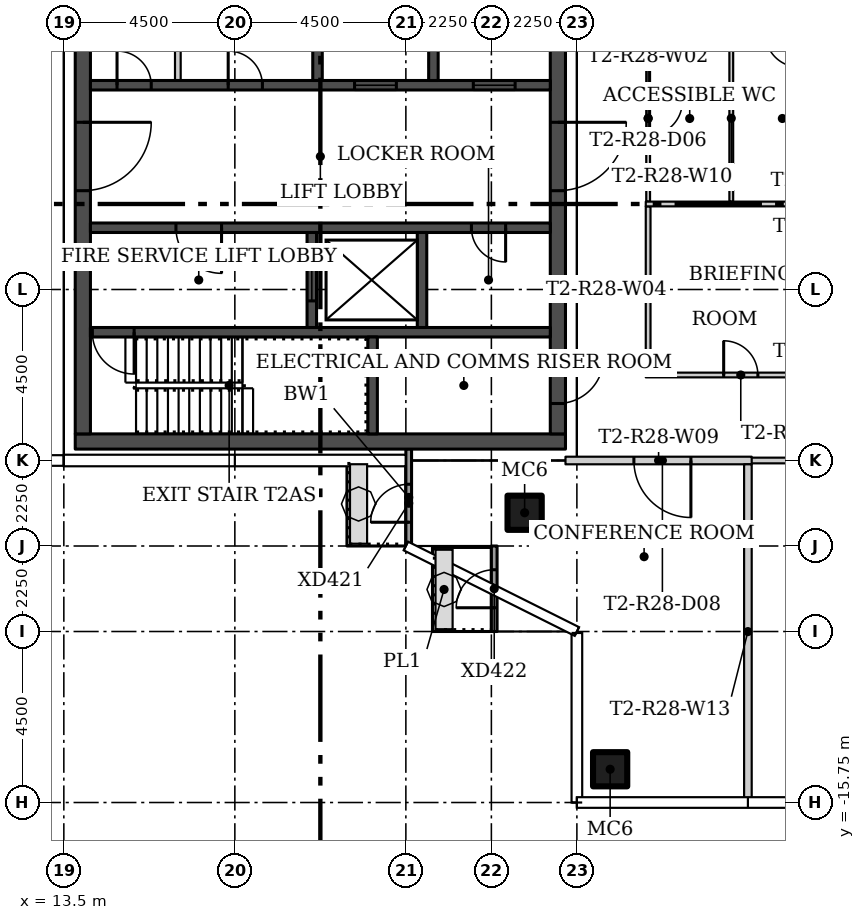
"""IFC4 building model, lengths in metres.
Left out: names, types, materials, properties, quantities, classifications, styles, units other than length and angle.
Written with IfcOpenShell. Run it as: python <this file> out.ifc"""

import sys

from ifc_helpers import new_model, si_unit, direction, frame, frame_2d, origin, origin_2d, place, context, subcontext, project, spatial, rectangle, hollow_rectangle, extrude, element, fill, save


model = new_model("IFC4")
c1 = context("Model", 3, precision=1e-05, world=origin(), true_north=direction((0.0, 1.0)))
c2 = subcontext(c1, "Body", "Model", "MODEL_VIEW")
j1 = project(units=[si_unit("LENGTHUNIT", "METRE"), si_unit("PLANEANGLEUNIT", "RADIAN")], contexts=[c1])
p1 = place(None, origin())
s1 = spatial("IfcSite", under=j1, at=p1, CompositionType="ELEMENT")
p2 = place(p1, origin())
s2 = spatial("IfcBuilding", under=s1, at=p2, CompositionType="ELEMENT")
p3 = place(p2, frame((0.0, 0.0, 257.7)))
s3 = spatial("IfcBuildingStorey", under=s2, at=p3, CompositionType="ELEMENT", Elevation=257.7)
for number, where in (
    (1, (25.625, -8.125, 0.0)),
    (2, (27.875, -14.875, 0.0)),
):
    element("IfcColumn", number, at=place(p3, frame(where)), inside=s3, PredefinedType="COLUMN", context=c2, shape_type="SweptSolid", body=[
        extrude(hollow_rectangle(XDim=0.9, YDim=0.9, WallThickness=0.036, at=origin_2d()), origin(), (0.0, 0.0, 1.0), 3.55),
    ])
p4 = place(p3, frame((28.875, 4.45, 0.0), z_axis=(0.0, 0.0, 1.0), x_axis=(0.0, -1.0, 0.0)))
e3 = element("IfcWall", 3, at=p4, inside=s3, PredefinedType="PARTITIONING", context=c2, shape_type="SweptSolid", body=[
    extrude(rectangle(XDim=4.387, YDim=0.1, at=frame_2d((2.194, 0.0))), origin(), (0.0, 0.0, 1.0), 3.55),
])
p5 = place(p4, frame((1.75, 0.0, 0.0)))
e4 = element("IfcOpeningElement", 4, at=p5, cuts=e3, PredefinedType="OPENING", context=c2, shape_type="SweptSolid", body=[
    extrude(rectangle(XDim=0.9, YDim=2.1, at=frame_2d((0.45, 1.05))), frame((0.0, 0.06, 0.0), z_axis=(0.0, -1.0, 0.0), x_axis=(1.0, 0.0, 0.0)), (0.0, 0.0, 1.0), 0.12),
])
p6 = place(p3, frame((28.812, -4.5, 0.0)))
e5 = element("IfcWall", 5, at=p6, inside=s3, PredefinedType="PARTITIONING", context=c2, shape_type="SweptSolid", body=[
    extrude(rectangle(XDim=9.875, YDim=0.125, at=frame_2d((4.938, 0.0))), origin(), (0.0, 0.0, 1.0), 3.55),
])
p7 = place(p6, frame((6.925, 0.0, 0.0)))
e6 = element("IfcOpeningElement", 6, at=p7, cuts=e5, PredefinedType="OPENING", context=c2, shape_type="SweptSolid", body=[
    extrude(rectangle(XDim=0.9, YDim=2.1, at=frame_2d((0.45, 1.05))), frame((0.0, 0.073, 0.0), z_axis=(0.0, -1.0, 0.0), x_axis=(1.0, 0.0, 0.0)), (0.0, 0.0, 1.0), 0.145),
])
p8 = place(p6, frame((2.05, 0.0, 0.0)))
e7 = element("IfcOpeningElement", 7, at=p8, cuts=e5, PredefinedType="OPENING", context=c2, shape_type="SweptSolid", body=[
    extrude(rectangle(XDim=0.9, YDim=2.1, at=frame_2d((0.45, 1.05))), frame((0.0, 0.073, 0.0), z_axis=(0.0, -1.0, 0.0), x_axis=(1.0, 0.0, 0.0)), (0.0, 0.0, 1.0), 0.145),
])
p9 = place(p3, frame((28.875, -0.062, 0.0), z_axis=(0.0, 0.0, 1.0), x_axis=(0.0, -1.0, 0.0)))
e8 = element("IfcWall", 8, at=p9, inside=s3, PredefinedType="PARTITIONING", context=c2, shape_type="SweptSolid", body=[
    extrude(rectangle(XDim=4.375, YDim=0.125, at=frame_2d((2.188, 0.0))), origin(), (0.0, 0.0, 1.0), 3.55),
])
p10 = place(p3, frame((40.8, -6.75, 0.0), z_axis=(0.0, 0.0, 1.0), x_axis=(-1.0, 0.0, 0.0)))
e9 = element("IfcWall", 9, at=p10, inside=s3, PredefinedType="PARTITIONING", context=c2, shape_type="SweptSolid", body=[
    extrude(rectangle(XDim=9.4, YDim=0.15, at=frame_2d((4.7, 0.0))), origin(), (0.0, 0.0, 1.0), 3.55),
])
p11 = place(p10, frame((4.3, 0.0, 0.0)))
e10 = element("IfcOpeningElement", 10, at=p11, cuts=e9, PredefinedType="OPENING", context=c2, shape_type="SweptSolid", body=[
    extrude(rectangle(XDim=1.0, YDim=2.4, at=frame_2d((0.5, 1.2))), frame((0.0, 0.085, 0.0), z_axis=(0.0, -1.0, 0.0), x_axis=(1.0, 0.0, 0.0)), (0.0, 0.0, 1.0), 0.17),
])
p12 = place(p3, frame((31.6, -6.75, 0.0), z_axis=(0.0, 0.0, 1.0), x_axis=(-1.0, 0.0, 0.0)))
e11 = element("IfcWall", 11, at=p12, inside=s3, PredefinedType="PARTITIONING", context=c2, shape_type="SweptSolid", body=[
    extrude(rectangle(XDim=4.9, YDim=0.2, at=frame_2d((2.45, 0.0))), origin(), (0.0, 0.0, 1.0), 3.55),
])
p13 = place(p12, frame((1.6, 0.0, 0.0)))
e12 = element("IfcOpeningElement", 12, at=p13, cuts=e11, PredefinedType="OPENING", context=c2, shape_type="SweptSolid", body=[
    extrude(rectangle(XDim=1.5, YDim=2.4, at=frame_2d((0.75, 1.2))), frame((0.0, 0.11, 0.0), z_axis=(0.0, -1.0, 0.0), x_axis=(1.0, 0.0, 0.0)), (0.0, 0.0, 1.0), 0.22),
])
p14 = place(p3, frame((31.062, 4.45, 0.0), z_axis=(0.0, 0.0, 1.0), x_axis=(0.0, -1.0, 0.0)))
e13 = element("IfcWall", 13, at=p14, inside=s3, PredefinedType="PARTITIONING", context=c2, shape_type="SweptSolid", body=[
    extrude(rectangle(XDim=4.387, YDim=0.1, at=frame_2d((2.194, 0.0))), origin(), (0.0, 0.0, 1.0), 3.55),
])
p15 = place(p3, frame((28.812, 0.0, 0.0)))
e14 = element("IfcWall", 14, at=p15, inside=s3, PredefinedType="PARTITIONING", context=c2, shape_type="SweptSolid", body=[
    extrude(rectangle(XDim=9.75, YDim=0.125, at=frame_2d((4.875, 0.0))), origin(), (0.0, 0.0, 1.0), 3.55),
])
p16 = place(p3, frame((31.5, -6.85, 0.0), z_axis=(0.0, 0.0, 1.0), x_axis=(0.0, -1.0, 0.0)))
e15 = element("IfcWall", 15, at=p16, inside=s3, PredefinedType="PARTITIONING", context=c2, shape_type="SweptSolid", body=[
    extrude(rectangle(XDim=8.805, YDim=0.2, at=frame_2d((4.402, 0.0))), origin(), (0.0, 0.0, 1.0), 3.55),
])
p17 = place(p3, frame((22.575, -9.0, 0.0), z_axis=(0.0, 0.0, 1.0), x_axis=(0.0, 1.0, 0.0)))
e16 = element("IfcWall", 16, at=p17, inside=s3, PredefinedType="SOLIDWALL", context=c2, shape_type="SweptSolid", body=[
    extrude(rectangle(XDim=2.557, YDim=0.15, at=frame_2d((1.278, 0.0))), origin(), (0.0, 0.0, 1.0), 3.45),
])
p18 = place(p17, frame((0.625, 0.0, 0.0)))
e17 = element("IfcOpeningElement", 17, at=p18, cuts=e16, PredefinedType="OPENING", context=c2, shape_type="SweptSolid", body=[
    extrude(rectangle(XDim=1.0, YDim=2.4, at=frame_2d((0.5, 1.2))), frame((0.0, 0.085, 0.0), z_axis=(0.0, -1.0, 0.0), x_axis=(1.0, 0.0, 0.0)), (0.0, 0.0, 1.0), 0.17),
])
p19 = place(p3, frame((24.825, -11.25, 0.0), z_axis=(0.0, 0.0, 1.0), x_axis=(0.0, 1.0, 0.0)))
e18 = element("IfcWall", 18, at=p19, inside=s3, PredefinedType="SOLIDWALL", context=c2, shape_type="SweptSolid", body=[
    extrude(rectangle(XDim=2.25, YDim=0.15, at=frame_2d((1.125, 0.0))), origin(), (0.0, 0.0, 1.0), 3.45),
])
p20 = place(p19, frame((0.625, 0.0, 0.0)))
e19 = element("IfcOpeningElement", 19, at=p20, cuts=e18, PredefinedType="OPENING", context=c2, shape_type="SweptSolid", body=[
    extrude(rectangle(XDim=1.0, YDim=2.4, at=frame_2d((0.5, 1.2))), frame((0.0, 0.085, 0.0), z_axis=(0.0, -1.0, 0.0), x_axis=(1.0, 0.0, 0.0)), (0.0, 0.0, 1.0), 0.17),
])
p21 = place(p3, frame((13.8, -6.25, 0.0)))
e20 = element("IfcWall", 20, at=p21, inside=s3, PredefinedType="SHEAR", context=c2, shape_type="SweptSolid", body=[
    extrude(rectangle(XDim=12.9, YDim=0.4, at=frame_2d((6.45, 0.0))), origin(), (0.0, 0.0, 1.0), 3.55),
])
p22 = place(p3, frame((14.0, 6.05, 0.0), z_axis=(0.0, 0.0, 1.0), x_axis=(0.0, -1.0, 0.0)))
e21 = element("IfcWall", 21, at=p22, inside=s3, PredefinedType="SHEAR", context=c2, shape_type="SweptSolid", body=[
    extrude(rectangle(XDim=12.1, YDim=0.4, at=frame_2d((6.05, 0.0))), origin(), (0.0, 0.0, 1.0), 3.55),
])
p23 = place(p22, frame((3.9, 0.0, 0.0)))
e22 = element("IfcOpeningElement", 22, at=p23, cuts=e21, PredefinedType="OPENING", context=c2, shape_type="SweptSolid", body=[
    extrude(rectangle(XDim=1.8, YDim=2.4, at=frame_2d((0.9, 1.2))), frame((0.0, 0.21, 0.0), z_axis=(0.0, -1.0, 0.0), x_axis=(1.0, 0.0, 0.0)), (0.0, 0.0, 1.0), 0.42),
])
p24 = place(p3, frame((26.5, 6.05, 0.0), z_axis=(0.0, 0.0, 1.0), x_axis=(0.0, -1.0, 0.0)))
e23 = element("IfcWall", 23, at=p24, inside=s3, PredefinedType="SHEAR", context=c2, shape_type="SweptSolid", body=[
    extrude(rectangle(XDim=12.1, YDim=0.4, at=frame_2d((6.05, 0.0))), origin(), (0.0, 0.0, 1.0), 3.55),
])
p25 = place(p24, frame((10.1, 0.0, 0.0)))
e24 = element("IfcOpeningElement", 24, at=p25, cuts=e23, PredefinedType="OPENING", context=c2, shape_type="SweptSolid", body=[
    extrude(rectangle(XDim=1.2, YDim=2.1, at=frame_2d((0.6, 1.05))), frame((0.0, 0.21, 0.0), z_axis=(0.0, -1.0, 0.0), x_axis=(1.0, 0.0, 0.0)), (0.0, 0.0, 1.0), 0.42),
])
p26 = place(p24, frame((3.9, 0.0, 0.0)))
e25 = element("IfcOpeningElement", 25, at=p26, cuts=e23, PredefinedType="OPENING", context=c2, shape_type="SweptSolid", body=[
    extrude(rectangle(XDim=1.8, YDim=2.4, at=frame_2d((0.9, 1.2))), frame((0.0, 0.21, 0.0), z_axis=(0.0, -1.0, 0.0), x_axis=(1.0, 0.0, 0.0)), (0.0, 0.0, 1.0), 0.42),
])
p27 = place(p3, frame((26.3, -3.375, 0.0), z_axis=(0.0, 0.0, 1.0), x_axis=(-1.0, 0.0, 0.0)))
e26 = element("IfcWall", 26, at=p27, inside=s3, PredefinedType="SHEAR", context=c2, shape_type="SweptSolid", body=[
    extrude(rectangle(XDim=12.1, YDim=0.25, at=frame_2d((6.05, 0.0))), origin(), (0.0, 0.0, 1.0), 3.55),
])
p28 = place(p27, frame((10.95, 0.0, 0.0)))
e27 = element("IfcOpeningElement", 27, at=p28, cuts=e26, PredefinedType="OPENING", context=c2, shape_type="SweptSolid", body=[
    extrude(rectangle(XDim=1.1, YDim=2.1, at=frame_2d((0.55, 1.05))), frame((0.0, 0.135, 0.0), z_axis=(0.0, -1.0, 0.0), x_axis=(1.0, 0.0, 0.0)), (0.0, 0.0, 1.0), 0.27),
])
p29 = place(p3, frame((21.625, -6.05, 0.0), z_axis=(0.0, 0.0, 1.0), x_axis=(0.0, 1.0, 0.0)))
e28 = element("IfcWall", 28, at=p29, inside=s3, PredefinedType="SHEAR", context=c2, shape_type="SweptSolid", body=[
    extrude(rectangle(XDim=2.55, YDim=0.25, at=frame_2d((1.275, 0.0))), origin(), (0.0, 0.0, 1.0), 3.55),
])
p30 = place(p3, frame((26.3, -0.625, 0.0), z_axis=(0.0, 0.0, 1.0), x_axis=(-1.0, 0.0, 0.0)))
e29 = element("IfcWall", 29, at=p30, inside=s3, PredefinedType="SHEAR", context=c2, shape_type="SweptSolid", body=[
    extrude(rectangle(XDim=12.1, YDim=0.25, at=frame_2d((6.05, 0.0))), origin(), (0.0, 0.0, 1.0), 3.55),
])
p31 = place(p30, frame((8.65, 0.0, 0.0)))
e30 = element("IfcOpeningElement", 30, at=p31, cuts=e29, PredefinedType="OPENING", context=c2, shape_type="SweptSolid", body=[
    extrude(rectangle(XDim=1.2, YDim=2.1, at=frame_2d((0.6, 1.05))), frame((0.0, 0.135, 0.0), z_axis=(0.0, -1.0, 0.0), x_axis=(1.0, 0.0, 0.0)), (0.0, 0.0, 1.0), 0.27),
])
p32 = place(p30, frame((1.175, 0.0, 0.0)))
e31 = element("IfcOpeningElement", 31, at=p32, cuts=e29, PredefinedType="OPENING", context=c2, shape_type="SweptSolid", body=[
    extrude(rectangle(XDim=0.9, YDim=2.1, at=frame_2d((0.45, 1.05))), frame((0.0, 0.135, 0.0), z_axis=(0.0, -1.0, 0.0), x_axis=(1.0, 0.0, 0.0)), (0.0, 0.0, 1.0), 0.27),
])
p33 = place(p3, frame((20.025, -3.25, 0.0), z_axis=(0.0, 0.0, 1.0), x_axis=(0.0, 1.0, 0.0)))
e32 = element("IfcWall", 32, at=p33, inside=s3, PredefinedType="SHEAR", context=c2, shape_type="SweptSolid", body=[
    extrude(rectangle(XDim=2.5, YDim=0.25, at=frame_2d((1.25, 0.0))), origin(), (0.0, 0.0, 1.0), 3.55),
])
p34 = place(p33, frame((0.7, 0.0, 0.0)))
e33 = element("IfcOpeningElement", 33, at=p34, cuts=e32, PredefinedType="OPENING", context=c2, shape_type="SweptSolid", body=[
    extrude(rectangle(XDim=1.1, YDim=2.1, at=frame_2d((0.55, 1.05))), frame((0.0, 0.135, 0.0), z_axis=(0.0, -1.0, 0.0), x_axis=(1.0, 0.0, 0.0)), (0.0, 0.0, 1.0), 0.27),
])
p35 = place(p3, frame((22.925, -3.25, 0.0), z_axis=(0.0, 0.0, 1.0), x_axis=(0.0, 1.0, 0.0)))
e34 = element("IfcWall", 34, at=p35, inside=s3, PredefinedType="SHEAR", context=c2, shape_type="SweptSolid", body=[
    extrude(rectangle(XDim=2.5, YDim=0.25, at=frame_2d((1.25, 0.0))), origin(), (0.0, 0.0, 1.0), 3.55),
])
p36 = place(p3, frame((14.2, 3.125, 0.0)))
e35 = element("IfcWall", 35, at=p36, inside=s3, PredefinedType="SHEAR", context=c2, shape_type="SweptSolid", body=[
    extrude(rectangle(XDim=12.1, YDim=0.25, at=frame_2d((6.05, 0.0))), origin(), (0.0, 0.0, 1.0), 3.55),
])
p37 = place(p36, frame((6.95, 0.0, 0.0)))
e36 = element("IfcOpeningElement", 36, at=p37, cuts=e35, PredefinedType="OPENING", context=c2, shape_type="SweptSolid", body=[
    extrude(rectangle(XDim=1.1, YDim=2.1, at=frame_2d((0.55, 1.05))), frame((0.0, 0.135, 0.0), z_axis=(0.0, -1.0, 0.0), x_axis=(1.0, 0.0, 0.0)), (0.0, 0.0, 1.0), 0.27),
])
p38 = place(p36, frame((10.075, 0.0, 0.0)))
e37 = element("IfcOpeningElement", 37, at=p38, cuts=e35, PredefinedType="OPENING", context=c2, shape_type="SweptSolid", body=[
    extrude(rectangle(XDim=1.1, YDim=2.1, at=frame_2d((0.55, 1.05))), frame((0.0, 0.135, 0.0), z_axis=(0.0, -1.0, 0.0), x_axis=(1.0, 0.0, 0.0)), (0.0, 0.0, 1.0), 0.27),
])
p39 = place(p36, frame((0.7, 0.0, 0.0)))
e38 = element("IfcOpeningElement", 38, at=p39, cuts=e35, PredefinedType="OPENING", context=c2, shape_type="SweptSolid", body=[
    extrude(rectangle(XDim=0.9, YDim=2.1, at=frame_2d((0.45, 1.05))), frame((0.0, 0.135, 0.0), z_axis=(0.0, -1.0, 0.0), x_axis=(1.0, 0.0, 0.0)), (0.0, 0.0, 1.0), 0.27),
])
p40 = place(p36, frame((3.625, 0.0, 0.0)))
e39 = element("IfcOpeningElement", 39, at=p40, cuts=e35, PredefinedType="OPENING", context=c2, shape_type="SweptSolid", body=[
    extrude(rectangle(XDim=0.9, YDim=2.1, at=frame_2d((0.45, 1.05))), frame((0.0, 0.135, 0.0), z_axis=(0.0, -1.0, 0.0), x_axis=(1.0, 0.0, 0.0)), (0.0, 0.0, 1.0), 0.27),
])
for number, where, z_axis, x_axis in (
    (40, (20.175, 3.25, 0.0), (0.0, 0.0, 1.0), (0.0, 1.0, 0.0)),
    (41, (23.225, 3.25, 0.0), (0.0, 0.0, 1.0), (0.0, 1.0, 0.0)),
):
    element("IfcWall", number, at=place(p3, frame(where, z_axis=z_axis, x_axis=x_axis)), inside=s3, PredefinedType="SHEAR", context=c2, shape_type="SweptSolid", body=[
        extrude(rectangle(XDim=2.8, YDim=0.25, at=frame_2d((1.4, 0.0))), origin(), (0.0, 0.0, 1.0), 3.55),
    ])
p41 = place(p3, frame((16.5, 3.25, 0.0), z_axis=(0.0, 0.0, 1.0), x_axis=(0.0, 1.0, 0.0)))
e42 = element("IfcWall", 42, at=p41, inside=s3, PredefinedType="PARTITIONING", context=c2, shape_type="SweptSolid", body=[
    extrude(rectangle(XDim=2.8, YDim=0.15, at=frame_2d((1.4, 0.0))), origin(), (0.0, 0.0, 1.0), 3.55),
])
p42 = place(p8, origin())
e43 = element("IfcDoor", 43, at=p42, inside=s3, OperationType="SINGLE_SWING_LEFT", PredefinedType="DOOR", context=c2, shape_type="SweptSolid", body=[
    extrude(rectangle(XDim=0.9, YDim=2.1, at=frame_2d((0.45, 1.05))), frame((0.0, 0.025, 0.0), z_axis=(0.0, -1.0, 0.0), x_axis=(1.0, 0.0, 0.0)), (0.0, 0.0, 1.0), 0.05),
])
fill(e7, e43)
p43 = place(p5, origin())
e44 = element("IfcDoor", 44, at=p43, inside=s3, OperationType="SINGLE_SWING_RIGHT", PredefinedType="DOOR", context=c2, shape_type="SweptSolid", body=[
    extrude(rectangle(XDim=0.9, YDim=2.1, at=frame_2d((0.45, 1.05))), frame((0.0, 0.025, 0.0), z_axis=(0.0, -1.0, 0.0), x_axis=(1.0, 0.0, 0.0)), (0.0, 0.0, 1.0), 0.05),
])
fill(e4, e44)
p44 = place(p13, origin())
e45 = element("IfcDoor", 45, at=p44, inside=s3, OperationType="DOUBLE_DOOR_SINGLE_SWING", PredefinedType="DOOR", context=c2, shape_type="SweptSolid", body=[
    extrude(rectangle(XDim=1.5, YDim=2.4, at=frame_2d((0.75, 1.2))), frame((0.0, 0.025, 0.0), z_axis=(0.0, -1.0, 0.0), x_axis=(1.0, 0.0, 0.0)), (0.0, 0.0, 1.0), 0.05),
])
fill(e12, e45)
p45 = place(p18, origin())
e46 = element("IfcDoor", 46, at=p45, inside=s3, OperationType="SINGLE_SWING_LEFT", PredefinedType="DOOR", context=c2, shape_type="SweptSolid", body=[
    extrude(rectangle(XDim=1.0, YDim=2.4, at=frame_2d((0.5, 1.2))), frame((0.0, 0.025, 0.0), z_axis=(0.0, -1.0, 0.0), x_axis=(1.0, 0.0, 0.0)), (0.0, 0.0, 1.0), 0.05),
])
fill(e17, e46)
p46 = place(p20, origin())
e47 = element("IfcDoor", 47, at=p46, inside=s3, OperationType="SINGLE_SWING_RIGHT", PredefinedType="DOOR", context=c2, shape_type="SweptSolid", body=[
    extrude(rectangle(XDim=1.0, YDim=2.4, at=frame_2d((0.5, 1.2))), frame((0.0, 0.025, 0.0), z_axis=(0.0, -1.0, 0.0), x_axis=(1.0, 0.0, 0.0)), (0.0, 0.0, 1.0), 0.05),
])
fill(e19, e47)
p47 = place(p23, origin())
e48 = element("IfcDoor", 48, at=p47, inside=s3, OperationType="DOUBLE_DOOR_SINGLE_SWING", PredefinedType="DOOR", context=c2, shape_type="SweptSolid", body=[
    extrude(rectangle(XDim=1.8, YDim=2.4, at=frame_2d((0.9, 1.2))), frame((0.0, 0.025, 0.0), z_axis=(0.0, -1.0, 0.0), x_axis=(1.0, 0.0, 0.0)), (0.0, 0.0, 1.0), 0.05),
])
fill(e22, e48)
p48 = place(p25, origin())
e49 = element("IfcDoor", 49, at=p48, inside=s3, OperationType="SINGLE_SWING_RIGHT", PredefinedType="DOOR", context=c2, shape_type="SweptSolid", body=[
    extrude(rectangle(XDim=1.2, YDim=2.1, at=frame_2d((0.6, 1.05))), frame((0.0, 0.025, 0.0), z_axis=(0.0, -1.0, 0.0), x_axis=(1.0, 0.0, 0.0)), (0.0, 0.0, 1.0), 0.05),
])
fill(e24, e49)
p49 = place(p26, origin())
e50 = element("IfcDoor", 50, at=p49, inside=s3, OperationType="DOUBLE_DOOR_SINGLE_SWING", PredefinedType="DOOR", context=c2, shape_type="SweptSolid", body=[
    extrude(rectangle(XDim=1.8, YDim=2.4, at=frame_2d((0.9, 1.2))), frame((0.0, 0.025, 0.0), z_axis=(0.0, -1.0, 0.0), x_axis=(1.0, 0.0, 0.0)), (0.0, 0.0, 1.0), 0.05),
])
fill(e25, e50)
p50 = place(p28, origin())
e51 = element("IfcDoor", 51, at=p50, inside=s3, OperationType="SINGLE_SWING_RIGHT", PredefinedType="DOOR", context=c2, shape_type="SweptSolid", body=[
    extrude(rectangle(XDim=1.1, YDim=2.1, at=frame_2d((0.55, 1.05))), frame((0.0, 0.025, 0.0), z_axis=(0.0, -1.0, 0.0), x_axis=(1.0, 0.0, 0.0)), (0.0, 0.0, 1.0), 0.05),
])
fill(e27, e51)
p51 = place(p31, origin())
e52 = element("IfcDoor", 52, at=p51, inside=s3, OperationType="SINGLE_SWING_RIGHT", PredefinedType="DOOR", context=c2, shape_type="SweptSolid", body=[
    extrude(rectangle(XDim=1.2, YDim=2.1, at=frame_2d((0.6, 1.05))), frame((0.0, 0.025, 0.0), z_axis=(0.0, -1.0, 0.0), x_axis=(1.0, 0.0, 0.0)), (0.0, 0.0, 1.0), 0.05),
])
fill(e30, e52)
p52 = place(p32, origin())
e53 = element("IfcDoor", 53, at=p52, inside=s3, OperationType="SINGLE_SWING_LEFT", PredefinedType="DOOR", context=c2, shape_type="SweptSolid", body=[
    extrude(rectangle(XDim=0.9, YDim=2.1, at=frame_2d((0.45, 1.05))), frame((0.0, 0.025, 0.0), z_axis=(0.0, -1.0, 0.0), x_axis=(1.0, 0.0, 0.0)), (0.0, 0.0, 1.0), 0.05),
])
fill(e31, e53)
p53 = place(p34, origin())
e54 = element("IfcDoor", 54, at=p53, inside=s3, OperationType="SLIDING_TO_LEFT", PredefinedType="DOOR", context=c2, shape_type="SweptSolid", body=[
    extrude(rectangle(XDim=1.1, YDim=2.1, at=frame_2d((0.55, 1.05))), frame((0.0, 0.025, 0.0), z_axis=(0.0, -1.0, 0.0), x_axis=(1.0, 0.0, 0.0)), (0.0, 0.0, 1.0), 0.05),
])
fill(e33, e54)
p54 = place(p37, origin())
e55 = element("IfcDoor", 55, at=p54, inside=s3, OperationType="SLIDING_TO_LEFT", PredefinedType="DOOR", context=c2, shape_type="SweptSolid", body=[
    extrude(rectangle(XDim=1.1, YDim=2.1, at=frame_2d((0.55, 1.05))), frame((0.0, 0.025, 0.0), z_axis=(0.0, -1.0, 0.0), x_axis=(1.0, 0.0, 0.0)), (0.0, 0.0, 1.0), 0.05),
])
fill(e36, e55)
p55 = place(p38, origin())
e56 = element("IfcDoor", 56, at=p55, inside=s3, OperationType="SLIDING_TO_LEFT", PredefinedType="DOOR", context=c2, shape_type="SweptSolid", body=[
    extrude(rectangle(XDim=1.1, YDim=2.1, at=frame_2d((0.55, 1.05))), frame((0.0, 0.025, 0.0), z_axis=(0.0, -1.0, 0.0), x_axis=(1.0, 0.0, 0.0)), (0.0, 0.0, 1.0), 0.05),
])
fill(e37, e56)
p56 = place(p39, origin())
e57 = element("IfcDoor", 57, at=p56, inside=s3, OperationType="SINGLE_SWING_LEFT", PredefinedType="DOOR", context=c2, shape_type="SweptSolid", body=[
    extrude(rectangle(XDim=0.9, YDim=2.1, at=frame_2d((0.45, 1.05))), frame((0.0, 0.025, 0.0), z_axis=(0.0, -1.0, 0.0), x_axis=(1.0, 0.0, 0.0)), (0.0, 0.0, 1.0), 0.05),
])
fill(e38, e57)
p57 = place(p40, origin())
e58 = element("IfcDoor", 58, at=p57, inside=s3, OperationType="SINGLE_SWING_LEFT", PredefinedType="DOOR", context=c2, shape_type="SweptSolid", body=[
    extrude(rectangle(XDim=0.9, YDim=2.1, at=frame_2d((0.45, 1.05))), frame((0.0, 0.025, 0.0), z_axis=(0.0, -1.0, 0.0), x_axis=(1.0, 0.0, 0.0)), (0.0, 0.0, 1.0), 0.05),
])
fill(e39, e58)
save(model, sys.argv[1])
